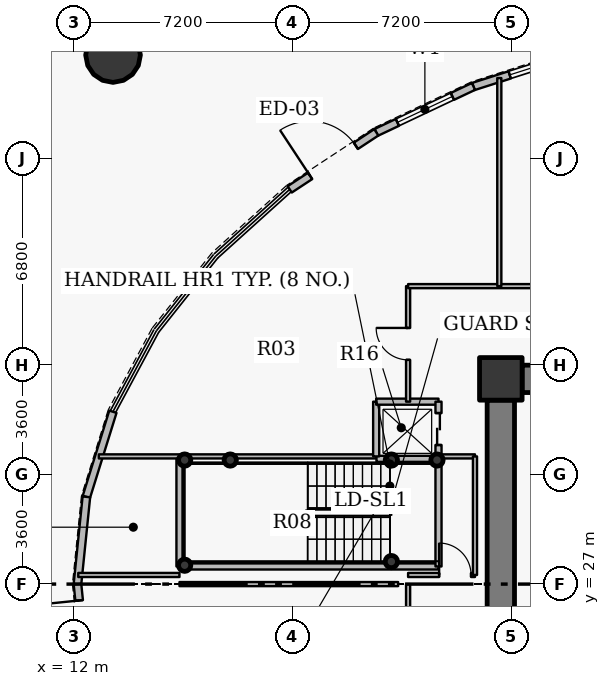
"""IFC4 building model, lengths in metres.
Left out: names, types, materials, properties, quantities, classifications, styles, units other than length and angle.
Written with IfcOpenShell. Run it as: python <this file> out.ifc"""

import sys

from ifc_helpers import new_model, si_unit, direction, frame, frame_2d, origin, origin_2d, place, context, subcontext, project, spatial, rectangle, hollow_circle, extrude, source, transform, mapped, element, fill, save


model = new_model("IFC4")
c1 = context("Model", 3, precision=1e-05, world=origin(), true_north=direction((0.0, 1.0)))
c2 = subcontext(c1, "Body", "Model", "MODEL_VIEW")
j1 = project(units=[si_unit("LENGTHUNIT", "METRE"), si_unit("PLANEANGLEUNIT", "RADIAN")], contexts=[c1])
p1 = place(None, origin())
s1 = spatial("IfcSite", under=j1, at=p1, CompositionType="ELEMENT")
p2 = place(p1, origin())
s2 = spatial("IfcBuilding", under=s1, at=p2, CompositionType="ELEMENT")
p3 = place(p2, origin())
s3 = spatial("IfcBuildingStorey", under=s2, at=p3, CompositionType="ELEMENT", Elevation=0.0)
p4 = place(p3, frame((26.05, 33.75, 0.0), z_axis=(0.0, 0.0, 1.0), x_axis=(1.0, 0.0, 0.0)))
e1 = element("IfcColumn", 1, at=p4, inside=s3, PredefinedType="COLUMN", context=c2, shape_type="SweptSolid", body=[
    extrude(rectangle(XDim=1.4, YDim=1.4, at=origin_2d()), origin(), (0.0, 0.0, 1.0), 6.0),
])
for number, where, z_axis, x_axis in (
    (2, (15.65, 27.62, 0.0), (0.0, 0.0, 1.0), (1.0, 0.0, 0.0)),
    (3, (15.65, 31.08, 0.0), (0.0, 0.0, 1.0), (1.0, 0.0, 0.0)),
    (4, (17.15, 31.08, 0.0), (0.0, 0.0, 1.0), (1.0, 0.0, 0.0)),
    (5, (22.45, 27.74, 0.0), (0.0, 0.0, 1.0), (1.0, 0.0, 0.0)),
    (6, (22.45, 31.08, 0.0), (0.0, 0.0, 1.0), (1.0, 0.0, 0.0)),
    (7, (23.95, 31.08, 0.0), (0.0, 0.0, 1.0), (1.0, 0.0, 0.0)),
):
    element("IfcColumn", number, at=place(p3, frame(where, z_axis=z_axis, x_axis=x_axis)), inside=s3, PredefinedType="COLUMN", context=c2, shape_type="SweptSolid", body=[
        extrude(hollow_circle(Radius=0.203, WallThickness=0.016, at=origin_2d()), origin(), (0.0, 0.0, 1.0), 6.0),
    ])
p5 = place(p3, frame((26.75, 33.75, 0.0), z_axis=(0.0, 0.0, 1.0), x_axis=(1.0, 0.0, 0.0)))
e8 = element("IfcWall", 8, at=p5, inside=s3, PredefinedType="SHEAR", context=c2, shape_type="SweptSolid", body=[
    extrude(rectangle(XDim=18.5, YDim=0.9, at=frame_2d((9.25, 0.0))), origin(), (0.0, 0.0, 1.0), 5.15),
])
p6 = place(p3, frame((26.05, 20.95, 0.0), z_axis=(0.0, 0.0, 1.0), x_axis=(0.0, 1.0, 0.0)))
e9 = element("IfcWall", 9, at=p6, inside=s3, PredefinedType="SHEAR", context=c2, shape_type="SweptSolid", body=[
    extrude(rectangle(XDim=12.1, YDim=0.9, at=frame_2d((6.05, 0.0))), origin(), (0.0, 0.0, 1.0), 5.15),
])
p7 = place(p6, frame((4.017, 0.0, 0.0)))
e10 = element("IfcOpeningElement", 10, at=p7, cuts=e9, PredefinedType="OPENING", context=c2, shape_type="SweptSolid", body=[
    extrude(rectangle(XDim=0.82, YDim=2.1, at=origin_2d()), frame((0.41, 0.46, 1.05), z_axis=(0.0, -1.0, 0.0), x_axis=(1.0, 0.0, 0.0)), (0.0, 0.0, 1.0), 0.92),
])
p8 = place(p3, frame((13.295, 44.401, 0.0), z_axis=(0.0, 0.0, 1.0), x_axis=(1.0, 0.0, 0.0)))
e11 = element("IfcColumn", 11, at=p8, inside=s3, PredefinedType="COLUMN", context=c2, shape_type="SweptSolid", body=[
    extrude(hollow_circle(Radius=0.9, WallThickness=0.05, at=origin_2d()), origin(), (0.0, 0.0, 1.0), 6.0),
])
p9 = place(p3, frame((25.15, 43.367, 0.0), z_axis=(0.0, 0.0, 1.0), x_axis=(0.952608721119, 0.304198330777, 0.0)))
e12 = element("IfcWall", 12, at=p9, inside=s3, PredefinedType="SOLIDWALL", context=c2, shape_type="SweptSolid", body=[
    extrude(rectangle(XDim=3.636, YDim=0.25, at=frame_2d((1.818, 0.0))), origin(), (0.0, 0.0, 1.0), 4.885),
])
p10 = place(p9, frame((1.25, 0.0, 0.9)))
e13 = element("IfcOpeningElement", 13, at=p10, cuts=e12, PredefinedType="OPENING", context=c2, shape_type="SweptSolid", body=[
    extrude(rectangle(XDim=1.6, YDim=1.75, at=origin_2d()), frame((0.8, 0.135, 0.875), z_axis=(0.0, -1.0, 0.0), x_axis=(1.0, 0.0, 0.0)), (0.0, 0.0, 1.0), 0.27),
])
p11 = place(p3, frame((21.954, 41.858, 0.0), z_axis=(0.0, 0.0, 1.0), x_axis=(0.9041930697, 0.427123978146, 0.0)))
e14 = element("IfcWall", 14, at=p11, inside=s3, PredefinedType="SOLIDWALL", context=c2, shape_type="SweptSolid", body=[
    extrude(rectangle(XDim=3.534, YDim=0.25, at=frame_2d((1.767, 0.0))), origin(), (0.0, 0.0, 1.0), 5.7),
])
p12 = place(p11, frame((0.767, 0.0, 0.9)))
e15 = element("IfcOpeningElement", 15, at=p12, cuts=e14, PredefinedType="OPENING", context=c2, shape_type="SweptSolid", body=[
    extrude(rectangle(XDim=2.0, YDim=1.75, at=origin_2d()), frame((1.0, 0.135, 0.875), z_axis=(0.0, -1.0, 0.0), x_axis=(1.0, 0.0, 0.0)), (0.0, 0.0, 1.0), 0.27),
])
p13 = place(p3, frame((19.106, 39.982, 0.0), z_axis=(0.0, 0.0, 1.0), x_axis=(0.835263082911, 0.549850509071, 0.0)))
e16 = element("IfcWall", 16, at=p13, inside=s3, PredefinedType="SOLIDWALL", context=c2, shape_type="SweptSolid", body=[
    extrude(rectangle(XDim=3.41, YDim=0.25, at=frame_2d((1.705, 0.0))), origin(), (0.0, 0.0, 1.0), 4.885),
])
p14 = place(p13, frame((0.805, 0.0, 0.0)))
e17 = element("IfcOpeningElement", 17, at=p14, cuts=e16, PredefinedType="OPENING", context=c2, shape_type="SweptSolid", body=[
    extrude(rectangle(XDim=1.8, YDim=2.2, at=origin_2d()), frame((0.9, 0.135, 1.1), z_axis=(0.0, -1.0, 0.0), x_axis=(1.0, 0.0, 0.0)), (0.0, 0.0, 1.0), 0.27),
])
p15 = place(p3, frame((12.418, 29.869, 0.0), z_axis=(0.0, 0.0, 1.0), x_axis=(0.297355038878, 0.954766977254, 0.0)))
e18 = element("IfcWall", 18, at=p15, inside=s3, PredefinedType="SOLIDWALL", context=c2, shape_type="SweptSolid", body=[
    extrude(rectangle(XDim=2.932, YDim=0.25, at=frame_2d((1.466, 0.0))), origin(), (0.0, 0.0, 1.0), 5.7),
])
p16 = place(p3, frame((12.125, 27.0, 0.0), z_axis=(0.0, 0.0, 1.0), x_axis=(0.10159063445, 0.994826287847, 0.0)))
e19 = element("IfcWall", 19, at=p16, inside=s3, PredefinedType="SOLIDWALL", context=c2, shape_type="SweptSolid", body=[
    extrude(rectangle(XDim=2.884, YDim=0.25, at=frame_2d((1.442, 0.0))), origin(), (0.0, 0.0, 1.0), 4.885),
])
p17 = place(p3, frame((12.418, 24.131, 0.0), z_axis=(0.0, 0.0, 1.0), x_axis=(-0.10159063445, 0.994826287847, 0.0)))
e20 = element("IfcWall", 20, at=p17, inside=s3, PredefinedType="SOLIDWALL", context=c2, shape_type="SweptSolid", body=[
    extrude(rectangle(XDim=2.884, YDim=0.25, at=frame_2d((1.442, 0.0))), origin(), (0.0, 0.0, 1.0), 4.885),
])
p18 = place(p17, frame((0.542, 0.0, 0.0)))
e21 = element("IfcOpeningElement", 21, at=p18, cuts=e20, PredefinedType="OPENING", context=c2, shape_type="SweptSolid", body=[
    extrude(rectangle(XDim=1.8, YDim=2.2, at=origin_2d()), frame((0.9, 0.135, 1.1), z_axis=(0.0, -1.0, 0.0), x_axis=(1.0, 0.0, 0.0)), (0.0, 0.0, 1.0), 0.27),
])
p19 = place(p3, frame((12.827, 31.2, 0.0), z_axis=(0.0, 0.0, 1.0), x_axis=(1.0, 0.0, 0.0)))
e22 = element("IfcWall", 22, at=p19, inside=s3, PredefinedType="PARTITIONING", context=c2, shape_type="SweptSolid", body=[
    extrude(rectangle(XDim=9.123, YDim=0.135, at=frame_2d((4.561, 0.0))), origin(), (0.0, 0.0, 1.0), 5.7),
])
p20 = place(p3, frame((15.48, 27.58, 0.0), z_axis=(0.0, 0.0, 1.0), x_axis=(0.0, 1.0, 0.0)))
e23 = element("IfcWall", 23, at=p20, inside=s3, PredefinedType="PARTITIONING", context=c2, shape_type="SweptSolid", body=[
    extrude(rectangle(XDim=3.54, YDim=0.2, at=frame_2d((1.77, 0.0))), origin(), (0.0, 0.0, 1.0), 5.7),
])
p21 = place(p3, frame((15.48, 27.58, 0.0), z_axis=(0.0, 0.0, 1.0), x_axis=(1.0, 0.0, 0.0)))
e24 = element("IfcWall", 24, at=p21, inside=s3, PredefinedType="PARTITIONING", context=c2, shape_type="SweptSolid", body=[
    extrude(rectangle(XDim=8.52, YDim=0.2, at=frame_2d((4.26, 0.0))), origin(), (0.0, 0.0, 1.0), 5.7),
])
p22 = place(p3, frame((21.96, 31.12, 0.0), z_axis=(0.0, 0.0, 1.0), x_axis=(1.0, 0.0, 0.0)))
e25 = element("IfcWall", 25, at=p22, inside=s3, PredefinedType="PARTITIONING", context=c2, shape_type="SweptSolid", body=[
    extrude(rectangle(XDim=2.04, YDim=0.2, at=frame_2d((1.02, 0.0))), origin(), (0.0, 0.0, 1.0), 5.7),
])
p23 = place(p3, frame((21.95, 31.2, 0.0), z_axis=(0.0, 0.0, 1.0), x_axis=(0.0, 1.0, 0.0)))
e26 = element("IfcWall", 26, at=p23, inside=s3, PredefinedType="PARTITIONING", context=c2, shape_type="SweptSolid", body=[
    extrude(rectangle(XDim=1.8, YDim=0.2, at=frame_2d((0.9, 0.0))), origin(), (0.0, 0.0, 1.0), 4.885),
])
p24 = place(p3, frame((21.95, 33.0, 0.0), z_axis=(0.0, 0.0, 1.0), x_axis=(1.0, 0.0, 0.0)))
e27 = element("IfcWall", 27, at=p24, inside=s3, PredefinedType="PARTITIONING", context=c2, shape_type="SweptSolid", body=[
    extrude(rectangle(XDim=2.05, YDim=0.2, at=frame_2d((1.025, 0.0))), origin(), (0.0, 0.0, 1.0), 5.7),
])
p25 = place(p3, frame((23.0, 17.2, 0.0), z_axis=(0.0, 0.0, 1.0), x_axis=(0.0, 1.0, 0.0)))
e28 = element("IfcWall", 28, at=p25, inside=s3, PredefinedType="PARTITIONING", context=c2, shape_type="SweptSolid", body=[
    extrude(rectangle(XDim=9.8, YDim=0.135, at=frame_2d((4.9, 0.0))), origin(), (0.0, 0.0, 1.0), 4.885),
])
p26 = place(p25, frame((4.375, 0.0, 0.0)))
e29 = element("IfcOpeningElement", 29, at=p26, cuts=e28, PredefinedType="OPENING", context=c2, shape_type="SweptSolid", body=[
    extrude(rectangle(XDim=1.05, YDim=2.15, at=origin_2d()), frame((0.525, 0.078, 1.075), z_axis=(0.0, -1.0, 0.0), x_axis=(1.0, 0.0, 0.0)), (0.0, 0.0, 1.0), 0.155),
])
p27 = place(p3, frame((23.0, 27.3, 0.0), z_axis=(0.0, 0.0, 1.0), x_axis=(1.0, 0.0, 0.0)))
e30 = element("IfcWall", 30, at=p27, inside=s3, PredefinedType="PARTITIONING", context=c2, shape_type="SweptSolid", body=[
    extrude(rectangle(XDim=2.2, YDim=0.135, at=frame_2d((1.1, 0.0))), origin(), (0.0, 0.0, 1.0), 5.7),
])
p28 = place(p27, frame((1.021, 0.0, 0.0)))
e31 = element("IfcOpeningElement", 31, at=p28, cuts=e30, PredefinedType="OPENING", context=c2, shape_type="SweptSolid", body=[
    extrude(rectangle(XDim=1.05, YDim=2.15, at=origin_2d()), frame((0.525, 0.078, 1.075), z_axis=(0.0, -1.0, 0.0), x_axis=(1.0, 0.0, 0.0)), (0.0, 0.0, 1.0), 0.155),
])
p29 = place(p3, frame((23.0, 33.0, 0.0), z_axis=(0.0, 0.0, 1.0), x_axis=(0.0, 1.0, 0.0)))
e32 = element("IfcWall", 32, at=p29, inside=s3, PredefinedType="PARTITIONING", context=c2, shape_type="SweptSolid", body=[
    extrude(rectangle(XDim=3.8, YDim=0.135, at=frame_2d((1.9, 0.0))), origin(), (0.0, 0.0, 1.0), 4.885),
])
p30 = place(p29, frame((1.375, 0.0, 0.0)))
e33 = element("IfcOpeningElement", 33, at=p30, cuts=e32, PredefinedType="OPENING", context=c2, shape_type="SweptSolid", body=[
    extrude(rectangle(XDim=1.05, YDim=2.15, at=origin_2d()), frame((0.525, 0.078, 1.075), z_axis=(0.0, -1.0, 0.0), x_axis=(1.0, 0.0, 0.0)), (0.0, 0.0, 1.0), 0.155),
])
p31 = place(p3, frame((23.0, 36.8, 0.0), z_axis=(0.0, 0.0, 1.0), x_axis=(1.0, 0.0, 0.0)))
e34 = element("IfcWall", 34, at=p31, inside=s3, PredefinedType="PARTITIONING", context=c2, shape_type="SweptSolid", body=[
    extrude(rectangle(XDim=11.2, YDim=0.135, at=frame_2d((5.6, 0.0))), origin(), (0.0, 0.0, 1.0), 4.885),
])
p32 = place(p3, frame((24.0, 27.58, 0.0), z_axis=(0.0, 0.0, 1.0), x_axis=(0.0, 1.0, 0.0)))
e35 = element("IfcWall", 35, at=p32, inside=s3, PredefinedType="PARTITIONING", context=c2, shape_type="SweptSolid", body=[
    extrude(rectangle(XDim=3.54, YDim=0.2, at=frame_2d((1.77, 0.0))), origin(), (0.0, 0.0, 1.0), 5.7),
])
p33 = place(p3, frame((24.0, 31.2, 0.0), z_axis=(0.0, 0.0, 1.0), x_axis=(0.0, 1.0, 0.0)))
e36 = element("IfcWall", 36, at=p33, inside=s3, PredefinedType="PARTITIONING", context=c2, shape_type="SweptSolid", body=[
    extrude(rectangle(XDim=1.8, YDim=0.2, at=frame_2d((0.9, 0.0))), origin(), (0.0, 0.0, 1.0), 4.885),
])
p34 = place(p33, frame((0.375, 0.0, 0.0)))
e37 = element("IfcOpeningElement", 37, at=p34, cuts=e36, PredefinedType="OPENING", context=c2, shape_type="SweptSolid", body=[
    extrude(rectangle(XDim=1.05, YDim=2.15, at=origin_2d()), frame((0.525, 0.11, 1.075), z_axis=(0.0, -1.0, 0.0), x_axis=(1.0, 0.0, 0.0)), (0.0, 0.0, 1.0), 0.22),
])
p35 = place(p3, frame((24.01, 31.2, 0.0), z_axis=(0.0, 0.0, 1.0), x_axis=(1.0, 0.0, 0.0)))
e38 = element("IfcWall", 38, at=p35, inside=s3, PredefinedType="PARTITIONING", context=c2, shape_type="SweptSolid", body=[
    extrude(rectangle(XDim=1.19, YDim=0.135, at=frame_2d((0.595, 0.0))), origin(), (0.0, 0.0, 1.0), 4.885),
])
p36 = place(p3, frame((25.2, 27.3, 0.0), z_axis=(0.0, 0.0, 1.0), x_axis=(0.0, 1.0, 0.0)))
e39 = element("IfcWall", 39, at=p36, inside=s3, PredefinedType="PARTITIONING", context=c2, shape_type="SweptSolid", body=[
    extrude(rectangle(XDim=3.9, YDim=0.135, at=frame_2d((1.95, 0.0))), origin(), (0.0, 0.0, 1.0), 4.885),
])
p37 = place(p3, frame((26.0, 36.8, 0.0), z_axis=(0.0, 0.0, 1.0), x_axis=(0.0, 1.0, 0.0)))
e40 = element("IfcWall", 40, at=p37, inside=s3, PredefinedType="PARTITIONING", context=c2, shape_type="SweptSolid", body=[
    extrude(rectangle(XDim=6.844, YDim=0.135, at=frame_2d((3.422, 0.0))), origin(), (0.0, 0.0, 1.0), 5.7),
])
p38 = place(p3, frame((15.48, 27.3, 0.0), z_axis=(0.0, 0.0, 1.0), x_axis=(-1.0, 0.0, 0.0)))
e41 = element("IfcWall", 41, at=p38, inside=s3, PredefinedType="PARTITIONING", context=c2, shape_type="SweptSolid", body=[
    extrude(rectangle(XDim=3.329, YDim=0.135, at=frame_2d((1.665, 0.0))), origin(), (0.0, 0.0, 1.0), 5.7),
])
p39 = place(p3, frame((26.74, 34.2, 0.0), z_axis=(0.0, 0.0, 1.0), x_axis=(-1.0, 0.0, 0.0)))
e42 = element("IfcWall", 42, at=p39, inside=s3, PredefinedType="PARTITIONING", context=c2, shape_type="SweptSolid", body=[
    extrude(rectangle(XDim=1.14, YDim=0.135, at=frame_2d((0.57, 0.0))), origin(), (0.0, 0.0, 1.0), 4.885),
])
p40 = place(p3, frame((25.6, 33.893, 0.0), z_axis=(0.0, 0.0, 1.0), x_axis=(0.0, -1.0, 0.0)))
e43 = element("IfcWall", 43, at=p40, inside=s3, PredefinedType="PARTITIONING", context=c2, shape_type="SweptSolid", body=[
    extrude(rectangle(XDim=0.833, YDim=0.135, at=frame_2d((0.416, 0.0))), origin(), (0.0, 0.0, 1.0), 5.7),
])
p41 = place(p3, frame((15.48, 27.0, 0.0), z_axis=(0.0, 0.0, 1.0), x_axis=(1.0, 0.0, 0.0)))
e44 = element("IfcWall", 44, at=p41, inside=s3, PredefinedType="PARTITIONING", context=c2, shape_type="SweptSolid", body=[
    extrude(rectangle(XDim=7.193, YDim=0.135, at=frame_2d((3.596, 0.0))), origin(), (0.0, 0.0, 1.0), 4.885),
])
m1 = source(origin(), c2, "Body", "SweptSolid", [
    extrude(rectangle(XDim=1.6, YDim=1.75, at=origin_2d()), frame((0.8, 0.03, 0.875), z_axis=(0.0, -1.0, 0.0), x_axis=(1.0, 0.0, 0.0)), (0.0, 0.0, 1.0), 0.06),
])
p42 = place(p10, origin())
e45 = element("IfcWindow", 45, at=p42, inside=s3, PartitioningType="DOUBLE_PANEL_VERTICAL", PredefinedType="WINDOW", context=c2, shape_type="MappedRepresentation", body=[
    mapped(m1, transform((0.0, 0.0, 0.0), x_axis=(1.0, 0.0, 0.0), y_axis=(0.0, 1.0, 0.0), z_axis=(0.0, 0.0, 1.0), scale=1.0)),
])
fill(e13, e45)
m2 = source(origin(), c2, "Body", "SweptSolid", [
    extrude(rectangle(XDim=2.0, YDim=1.75, at=origin_2d()), frame((1.0, 0.03, 0.875), z_axis=(0.0, -1.0, 0.0), x_axis=(1.0, 0.0, 0.0)), (0.0, 0.0, 1.0), 0.06),
])
p43 = place(p12, origin())
e46 = element("IfcWindow", 46, at=p43, inside=s3, PartitioningType="DOUBLE_PANEL_VERTICAL", PredefinedType="WINDOW", context=c2, shape_type="MappedRepresentation", body=[
    mapped(m2, transform((0.0, 0.0, 0.0), x_axis=(1.0, 0.0, 0.0), y_axis=(0.0, 1.0, 0.0), z_axis=(0.0, 0.0, 1.0), scale=1.0)),
])
fill(e15, e46)
m3 = source(origin(), c2, "Body", "SweptSolid", [
    extrude(rectangle(XDim=1.8, YDim=2.2, at=origin_2d()), frame((0.9, 0.025, 1.1), z_axis=(0.0, -1.0, 0.0), x_axis=(1.0, 0.0, 0.0)), (0.0, 0.0, 1.0), 0.05),
])
p44 = place(p14, origin())
e47 = element("IfcDoor", 47, at=p44, inside=s3, OperationType="SINGLE_SWING_LEFT", PredefinedType="DOOR", context=c2, shape_type="MappedRepresentation", body=[
    mapped(m3, transform((0.0, 0.0, 0.0), x_axis=(1.0, 0.0, 0.0), y_axis=(0.0, 1.0, 0.0), z_axis=(0.0, 0.0, 1.0), scale=1.0)),
])
fill(e17, e47)
p45 = place(p18, origin())
e48 = element("IfcDoor", 48, at=p45, inside=s3, OperationType="SINGLE_SWING_RIGHT", PredefinedType="DOOR", context=c2, shape_type="MappedRepresentation", body=[
    mapped(m3, transform((0.0, 0.0, 0.0), x_axis=(1.0, 0.0, 0.0), y_axis=(0.0, 1.0, 0.0), z_axis=(0.0, 0.0, 1.0), scale=1.0)),
])
fill(e21, e48)
m4 = source(origin(), c2, "Body", "SweptSolid", [
    extrude(rectangle(XDim=1.05, YDim=2.15, at=origin_2d()), frame((0.525, 0.025, 1.075), z_axis=(0.0, -1.0, 0.0), x_axis=(1.0, 0.0, 0.0)), (0.0, 0.0, 1.0), 0.05),
])
p46 = place(p34, origin())
e49 = element("IfcDoor", 49, at=p46, inside=s3, OperationType="DOUBLE_DOOR_SLIDING", PredefinedType="USERDEFINED", context=c2, shape_type="MappedRepresentation", body=[
    mapped(m4, transform((0.0, 0.0, 0.0), x_axis=(1.0, 0.0, 0.0), y_axis=(0.0, 1.0, 0.0), z_axis=(0.0, 0.0, 1.0), scale=1.0)),
])
fill(e37, e49)
m5 = source(origin(), c2, "Body", "SweptSolid", [
    extrude(rectangle(XDim=1.05, YDim=2.15, at=origin_2d()), frame((0.525, 0.025, 1.075), z_axis=(0.0, -1.0, 0.0), x_axis=(1.0, 0.0, 0.0)), (0.0, 0.0, 1.0), 0.05),
])
p47 = place(p28, origin())
e50 = element("IfcDoor", 50, at=p47, inside=s3, OperationType="SINGLE_SWING_LEFT", PredefinedType="DOOR", context=c2, shape_type="MappedRepresentation", body=[
    mapped(m5, transform((0.0, 0.0, 0.0), x_axis=(1.0, 0.0, 0.0), y_axis=(0.0, 1.0, 0.0), z_axis=(0.0, 0.0, 1.0), scale=1.0)),
])
fill(e31, e50)
p48 = place(p30, origin())
e51 = element("IfcDoor", 51, at=p48, inside=s3, OperationType="SINGLE_SWING_RIGHT", PredefinedType="DOOR", context=c2, shape_type="MappedRepresentation", body=[
    mapped(m5, transform((0.0, 0.0, 0.0), x_axis=(1.0, 0.0, 0.0), y_axis=(0.0, 1.0, 0.0), z_axis=(0.0, 0.0, 1.0), scale=1.0)),
])
fill(e33, e51)
save(model, sys.argv[1])
